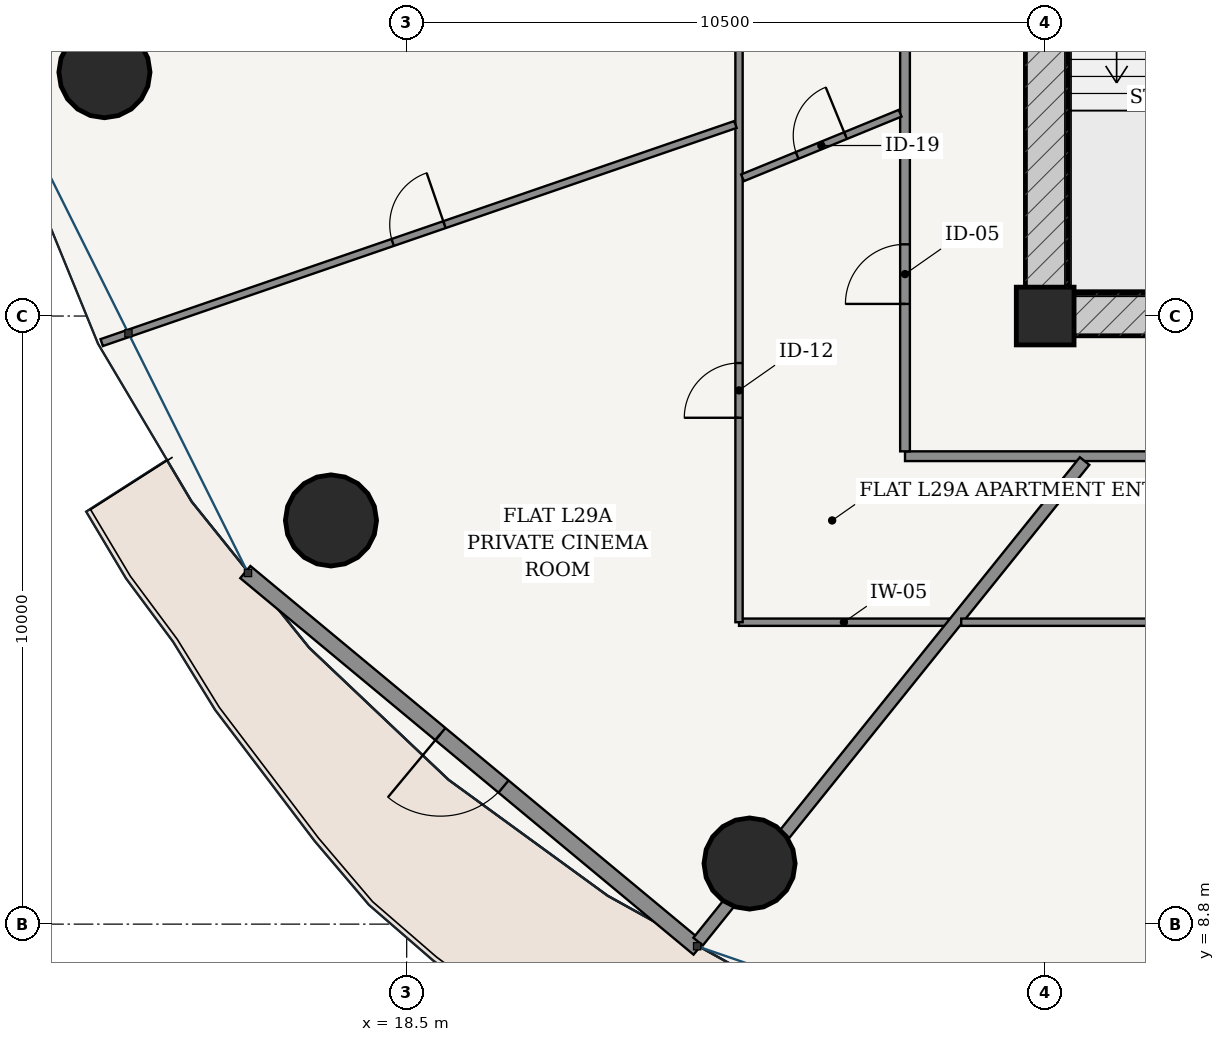
"""IFC4 building model, lengths in metres.
Left out: names, types, materials, properties, quantities, classifications, styles, units other than length and angle.
Written with IfcOpenShell. Run it as: python <this file> out.ifc"""

import sys

from ifc_helpers import new_model, si_unit, direction, frame, frame_2d, origin, origin_2d, place, context, subcontext, project, spatial, rectangle, hollow_circle, extrude, source, transform, mapped, element, fill, save


model = new_model("IFC4")
c1 = context("Model", 3, precision=1e-05, world=origin(), true_north=direction((-0.2419218956, 0.970295726276)))
c2 = subcontext(c1, "Body", "Model", "MODEL_VIEW")
j1 = project(units=[si_unit("LENGTHUNIT", "METRE"), si_unit("PLANEANGLEUNIT", "RADIAN")], contexts=[c1])
p1 = place(None, origin())
s1 = spatial("IfcSite", under=j1, at=p1, CompositionType="ELEMENT")
p2 = place(p1, origin())
s2 = spatial("IfcBuilding", under=s1, at=p2, CompositionType="ELEMENT")
p3 = place(p2, frame((0.0, 0.0, 112.2)))
s3 = spatial("IfcBuildingStorey", under=s2, at=p3, CompositionType="ELEMENT", Elevation=112.2)
p4 = place(p3, frame((29.0, 18.8, 0.0), z_axis=(0.0, 0.0, 1.0), x_axis=(1.0, 0.0, 0.0)))
e1 = element("IfcColumn", 1, at=p4, inside=s3, PredefinedType="COLUMN", context=c2, shape_type="SweptSolid", body=[
    extrude(rectangle(XDim=0.95, YDim=0.95, at=origin_2d()), origin(), (0.0, 0.0, 1.0), 3.6),
])
p5 = place(p3, frame((28.675, 18.825, 0.0), z_axis=(0.0, 0.0, 1.0), x_axis=(1.0, 0.0, 0.0)))
e2 = element("IfcWall", 2, at=p5, inside=s3, PredefinedType="SHEAR", context=c2, shape_type="SweptSolid", body=[
    extrude(rectangle(XDim=18.65, YDim=0.7, at=frame_2d((9.325, 0.0))), origin(), (0.0, 0.0, 1.0), 3.325),
])
p6 = place(p5, frame((7.577, 0.0, 0.0)))
e3 = element("IfcOpeningElement", 3, at=p6, cuts=e2, PredefinedType="OPENING", context=c2, shape_type="SweptSolid", body=[
    extrude(rectangle(XDim=0.85, YDim=2.1, at=frame_2d((0.425, 1.05))), frame((0.0, 0.36, 0.0), z_axis=(0.0, -1.0, 0.0), x_axis=(1.0, 0.0, 0.0)), (0.0, 0.0, 1.0), 0.72),
])
p7 = place(p5, frame((10.623, 0.0, 0.0)))
e4 = element("IfcOpeningElement", 4, at=p7, cuts=e2, PredefinedType="OPENING", context=c2, shape_type="SweptSolid", body=[
    extrude(rectangle(XDim=0.85, YDim=2.1, at=frame_2d((0.425, 1.05))), frame((0.0, 0.36, 0.0), z_axis=(0.0, -1.0, 0.0), x_axis=(1.0, 0.0, 0.0)), (0.0, 0.0, 1.0), 0.72),
])
p8 = place(p3, frame((29.025, 19.175, 0.0), z_axis=(0.0, 0.0, 1.0), x_axis=(0.0, 1.0, 0.0)))
e5 = element("IfcWall", 5, at=p8, inside=s3, PredefinedType="SHEAR", context=c2, shape_type="SweptSolid", body=[
    extrude(rectangle(XDim=15.25, YDim=0.7, at=frame_2d((7.625, 0.0))), origin(), (0.0, 0.0, 1.0), 3.325),
])
p9 = place(p8, frame((9.875, 0.0, 0.0)))
e6 = element("IfcOpeningElement", 6, at=p9, cuts=e5, PredefinedType="OPENING", context=c2, shape_type="SweptSolid", body=[
    extrude(rectangle(XDim=1.5, YDim=2.2, at=frame_2d((0.75, 1.1))), frame((0.0, 0.36, 0.0), z_axis=(0.0, -1.0, 0.0), x_axis=(1.0, 0.0, 0.0)), (0.0, 0.0, 1.0), 0.72),
])
for number, where, z_axis, x_axis in (
    (7, (13.529, 22.81, 0.0), (0.0, 0.0, 1.0), (1.0, 0.0, 0.0)),
    (8, (17.255, 15.438, 0.0), (0.0, 0.0, 1.0), (1.0, 0.0, 0.0)),
    (9, (24.138, 9.796, 0.0), (0.0, 0.0, 1.0), (1.0, 0.0, 0.0)),
):
    element("IfcColumn", number, at=place(p3, frame(where, z_axis=z_axis, x_axis=x_axis)), inside=s3, PredefinedType="COLUMN", context=c2, shape_type="SweptSolid", body=[
        extrude(hollow_circle(Radius=0.75, WallThickness=0.045, at=origin_2d()), origin(), (0.0, 0.0, 1.0), 3.6),
    ])
p10 = place(p3, frame((15.846, 14.59, 0.0), z_axis=(0.0, 0.0, 1.0), x_axis=(0.769254958887, -0.638941944333, 0.0)))
e10 = element("IfcWall", 10, at=p10, inside=s3, PredefinedType="SOLIDWALL", context=c2, shape_type="SweptSolid", body=[
    extrude(rectangle(XDim=9.69, YDim=0.26, at=frame_2d((4.845, 0.0))), origin(), (0.0, 0.0, 1.0), 3.325),
])
p11 = place(p10, frame((4.17, 0.0, 0.0)))
e11 = element("IfcOpeningElement", 11, at=p11, cuts=e10, PredefinedType="OPENING", context=c2, shape_type="SweptSolid", body=[
    extrude(rectangle(XDim=1.35, YDim=2.2, at=frame_2d((0.675, 1.1))), frame((0.0, 0.14, 0.0), z_axis=(0.0, -1.0, 0.0), x_axis=(1.0, 0.0, 0.0)), (0.0, 0.0, 1.0), 0.28),
])
p12 = place(p3, frame((26.695, 16.495, 0.0), z_axis=(0.0, 0.0, 1.0), x_axis=(1.0, 0.0, 0.0)))
e12 = element("IfcWall", 12, at=p12, inside=s3, PredefinedType="PARTITIONING", context=c2, shape_type="SweptSolid", body=[
    extrude(rectangle(XDim=22.61, YDim=0.16, at=frame_2d((11.305, 0.0))), origin(), (0.0, 0.0, 1.0), 2.767),
])
p13 = place(p3, frame((26.695, 16.575, 0.0), z_axis=(0.0, 0.0, 1.0), x_axis=(0.0, 1.0, 0.0)))
e13 = element("IfcWall", 13, at=p13, inside=s3, PredefinedType="PARTITIONING", context=c2, shape_type="SweptSolid", body=[
    extrude(rectangle(XDim=20.45, YDim=0.16, at=frame_2d((10.225, 0.0))), origin(), (0.0, 0.0, 1.0), 2.767),
])
p14 = place(p13, frame((2.424, 0.0, 0.0)))
e14 = element("IfcOpeningElement", 14, at=p14, cuts=e13, PredefinedType="OPENING", context=c2, shape_type="SweptSolid", body=[
    extrude(rectangle(XDim=0.98, YDim=2.2, at=frame_2d((0.49, 1.1))), frame((0.0, 0.09, 0.0), z_axis=(0.0, -1.0, 0.0), x_axis=(1.0, 0.0, 0.0)), (0.0, 0.0, 1.0), 0.18),
])
p15 = place(p3, frame((27.415, 13.765, 0.0), z_axis=(0.0, 0.0, 1.0), x_axis=(-1.0, 0.0, 0.0)))
e15 = element("IfcWall", 15, at=p15, inside=s3, PredefinedType="PARTITIONING", context=c2, shape_type="SweptSolid", body=[
    extrude(rectangle(XDim=3.45, YDim=0.12, at=frame_2d((1.725, 0.0))), origin(), (0.0, 0.0, 1.0), 2.767),
])
p16 = place(p3, frame((23.965, 13.765, 0.0), z_axis=(0.0, 0.0, 1.0), x_axis=(0.0, 1.0, 0.0)))
e16 = element("IfcWall", 16, at=p16, inside=s3, PredefinedType="PARTITIONING", context=c2, shape_type="SweptSolid", body=[
    extrude(rectangle(XDim=26.07, YDim=0.12, at=frame_2d((13.035, 0.0))), origin(), (0.0, 0.0, 1.0), 2.767),
])
p17 = place(p16, frame((3.362, 0.0, 0.0)))
e17 = element("IfcOpeningElement", 17, at=p17, cuts=e16, PredefinedType="OPENING", context=c2, shape_type="SweptSolid", body=[
    extrude(rectangle(XDim=0.9, YDim=2.15, at=frame_2d((0.45, 1.075))), frame((0.0, 0.07, 0.0), z_axis=(0.0, -1.0, 0.0), x_axis=(1.0, 0.0, 0.0)), (0.0, 0.0, 1.0), 0.14),
])
p18 = place(p16, frame((13.924, 0.0, 0.0)))
e18 = element("IfcOpeningElement", 18, at=p18, cuts=e16, PredefinedType="OPENING", context=c2, shape_type="SweptSolid", body=[
    extrude(rectangle(XDim=0.9, YDim=2.15, at=frame_2d((0.45, 1.075))), frame((0.0, 0.07, 0.0), z_axis=(0.0, -1.0, 0.0), x_axis=(1.0, 0.0, 0.0)), (0.0, 0.0, 1.0), 0.14),
])
p19 = place(p3, frame((23.906, 21.95, 0.0), z_axis=(0.0, 0.0, 1.0), x_axis=(-0.945573120726, -0.32540970078, 0.0)))
e19 = element("IfcWall", 19, at=p19, inside=s3, PredefinedType="PARTITIONING", context=c2, shape_type="SweptSolid", body=[
    extrude(rectangle(XDim=11.022, YDim=0.12, at=frame_2d((5.511, 0.0))), origin(), (0.0, 0.0, 1.0), 2.767),
])
p20 = place(p19, frame((5.061, 0.0, 0.0)))
e20 = element("IfcOpeningElement", 20, at=p20, cuts=e19, PredefinedType="OPENING", context=c2, shape_type="SweptSolid", body=[
    extrude(rectangle(XDim=0.9, YDim=2.15, at=frame_2d((0.45, 1.075))), frame((0.0, 0.07, 0.0), z_axis=(0.0, -1.0, 0.0), x_axis=(1.0, 0.0, 0.0)), (0.0, 0.0, 1.0), 0.14),
])
p21 = place(p3, frame((26.615, 22.135, 0.0), z_axis=(0.0, 0.0, 1.0), x_axis=(-0.925337216259, -0.379145138708, 0.0)))
e21 = element("IfcWall", 21, at=p21, inside=s3, PredefinedType="PARTITIONING", context=c2, shape_type="SweptSolid", body=[
    extrude(rectangle(XDim=2.802, YDim=0.12, at=frame_2d((1.401, 0.0))), origin(), (0.0, 0.0, 1.0), 3.325),
])
p22 = place(p21, frame((0.971, 0.0, 0.0)))
e22 = element("IfcOpeningElement", 22, at=p22, cuts=e21, PredefinedType="OPENING", context=c2, shape_type="SweptSolid", body=[
    extrude(rectangle(XDim=0.86, YDim=2.15, at=frame_2d((0.43, 1.075))), frame((0.0, 0.07, 0.0), z_axis=(0.0, -1.0, 0.0), x_axis=(1.0, 0.0, 0.0)), (0.0, 0.0, 1.0), 0.14),
])
p23 = place(p3, frame((29.648, 16.415, 0.0), z_axis=(0.0, 0.0, 1.0), x_axis=(-0.626701127389, -0.779259710834, 0.0)))
e23 = element("IfcWall", 23, at=p23, inside=s3, PredefinedType="PARTITIONING", context=c2, shape_type="SweptSolid", body=[
    extrude(rectangle(XDim=10.141, YDim=0.2, at=frame_2d((5.071, 0.0))), origin(), (0.0, 0.0, 1.0), 2.767),
])
p24 = place(p3, frame((52.035, 13.765, 0.0), z_axis=(0.0, 0.0, 1.0), x_axis=(-1.0, 0.0, 0.0)))
e24 = element("IfcWall", 24, at=p24, inside=s3, PredefinedType="PARTITIONING", context=c2, shape_type="SweptSolid", body=[
    extrude(rectangle(XDim=24.416, YDim=0.12, at=frame_2d((12.208, 0.0))), origin(), (0.0, 0.0, 1.0), 2.767),
])
p25 = place(p24, frame((4.192, 0.0, 0.0)))
e25 = element("IfcOpeningElement", 25, at=p25, cuts=e24, PredefinedType="OPENING", context=c2, shape_type="SweptSolid", body=[
    extrude(rectangle(XDim=0.9, YDim=2.15, at=frame_2d((0.45, 1.075))), frame((0.0, 0.07, 0.0), z_axis=(0.0, -1.0, 0.0), x_axis=(1.0, 0.0, 0.0)), (0.0, 0.0, 1.0), 0.14),
])
p26 = place(p24, frame((19.728, 0.0, 0.0)))
e26 = element("IfcOpeningElement", 26, at=p26, cuts=e24, PredefinedType="OPENING", context=c2, shape_type="SweptSolid", body=[
    extrude(rectangle(XDim=0.86, YDim=2.15, at=frame_2d((0.43, 1.075))), frame((0.0, 0.07, 0.0), z_axis=(0.0, -1.0, 0.0), x_axis=(1.0, 0.0, 0.0)), (0.0, 0.0, 1.0), 0.14),
])
m1 = source(origin(), c2, "Body", "SweptSolid", [
    extrude(rectangle(XDim=1.35, YDim=2.2, at=frame_2d((0.675, 1.1))), frame((0.0, 0.025, 0.0), z_axis=(0.0, -1.0, 0.0), x_axis=(1.0, 0.0, 0.0)), (0.0, 0.0, 1.0), 0.05),
])
p27 = place(p11, frame((1.35, 0.0, 0.0), z_axis=(0.0, 0.0, 1.0), x_axis=(-1.0, 0.0, 0.0)))
e27 = element("IfcDoor", 27, at=p27, inside=s3, OperationType="SINGLE_SWING_RIGHT", PredefinedType="DOOR", context=c2, shape_type="MappedRepresentation", body=[
    mapped(m1, transform((0.0, 0.0, 0.0), scale=1.0)),
])
fill(e11, e27)
m2 = source(origin(), c2, "Body", "SweptSolid", [
    extrude(rectangle(XDim=0.98, YDim=2.2, at=frame_2d((0.49, 1.1))), frame((0.0, 0.025, 0.0), z_axis=(0.0, -1.0, 0.0), x_axis=(1.0, 0.0, 0.0)), (0.0, 0.0, 1.0), 0.05),
])
p28 = place(p14, origin())
e28 = element("IfcDoor", 28, at=p28, inside=s3, OperationType="SINGLE_SWING_LEFT", PredefinedType="DOOR", context=c2, shape_type="MappedRepresentation", body=[
    mapped(m2, transform((0.0, 0.0, 0.0), scale=1.0)),
])
fill(e14, e28)
m3 = source(origin(), c2, "Body", "SweptSolid", [
    extrude(rectangle(XDim=0.86, YDim=2.15, at=frame_2d((0.43, 1.075))), frame((0.0, 0.025, 0.0), z_axis=(0.0, -1.0, 0.0), x_axis=(1.0, 0.0, 0.0)), (0.0, 0.0, 1.0), 0.05),
])
p29 = place(p22, frame((0.86, 0.0, 0.0), z_axis=(0.0, 0.0, 1.0), x_axis=(-1.0, 0.0, 0.0)))
e29 = element("IfcDoor", 29, at=p29, inside=s3, OperationType="SINGLE_SWING_RIGHT", PredefinedType="DOOR", context=c2, shape_type="MappedRepresentation", body=[
    mapped(m3, transform((0.0, 0.0, 0.0), scale=1.0)),
])
fill(e22, e29)
m4 = source(origin(), c2, "Body", "SweptSolid", [
    extrude(rectangle(XDim=0.9, YDim=2.15, at=frame_2d((0.45, 1.075))), frame((0.0, 0.025, 0.0), z_axis=(0.0, -1.0, 0.0), x_axis=(1.0, 0.0, 0.0)), (0.0, 0.0, 1.0), 0.05),
])
p30 = place(p17, origin())
e30 = element("IfcDoor", 30, at=p30, inside=s3, OperationType="SINGLE_SWING_LEFT", PredefinedType="DOOR", context=c2, shape_type="MappedRepresentation", body=[
    mapped(m4, transform((0.0, 0.0, 0.0), scale=1.0)),
])
fill(e17, e30)
p31 = place(p20, frame((0.9, 0.0, 0.0), z_axis=(0.0, 0.0, 1.0), x_axis=(-1.0, 0.0, 0.0)))
e31 = element("IfcDoor", 31, at=p31, inside=s3, OperationType="SINGLE_SWING_RIGHT", PredefinedType="DOOR", context=c2, shape_type="MappedRepresentation", body=[
    mapped(m4, transform((0.0, 0.0, 0.0), scale=1.0)),
])
fill(e20, e31)
save(model, sys.argv[1])
